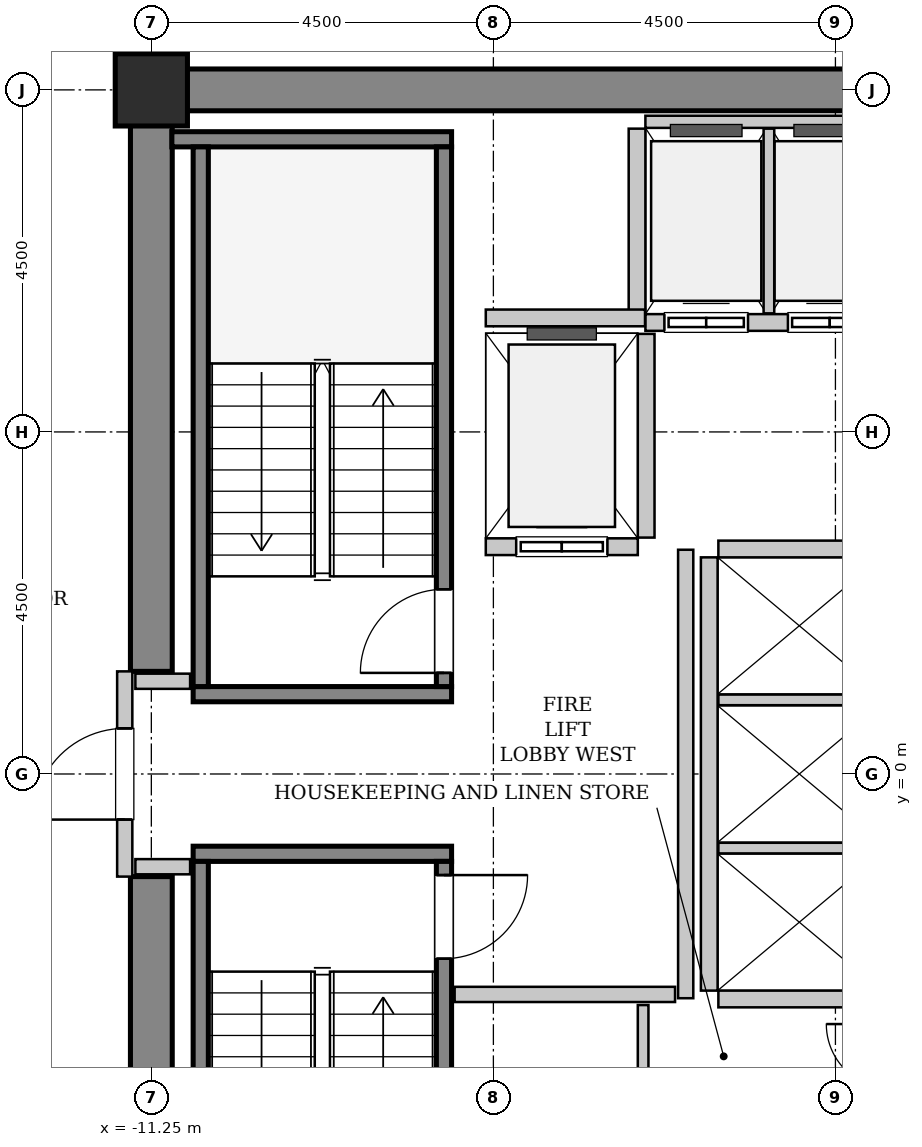
"""IFC4 building model, lengths in metres.
Left out: names, types, materials, properties, quantities, classifications, styles, units other than length and angle.
Written with IfcOpenShell. Run it as: python <this file> out.ifc"""

import sys

from ifc_helpers import new_model, si_unit, direction, frame, frame_2d, origin, origin_2d, place, context, subcontext, project, spatial, rectangle, hollow_rectangle, extrude, source, transform, mapped, element, fill, save


model = new_model("IFC4")
c1 = context("Model", 3, precision=1e-05, world=origin(), true_north=direction((0.0, 1.0)))
c2 = subcontext(c1, "Body", "Model", "MODEL_VIEW")
j1 = project(units=[si_unit("LENGTHUNIT", "METRE"), si_unit("PLANEANGLEUNIT", "RADIAN")], contexts=[c1])
p1 = place(None, origin())
s1 = spatial("IfcSite", under=j1, at=p1, CompositionType="ELEMENT")
p2 = place(p1, origin())
s2 = spatial("IfcBuilding", under=s1, at=p2, CompositionType="ELEMENT")
p3 = place(p2, frame((0.0, 0.0, 106.0)))
s3 = spatial("IfcBuildingStorey", under=s2, at=p3, CompositionType="ELEMENT", Elevation=106.0)
m1 = source(origin(), c2, "Body", "SweptSolid", [
    extrude(rectangle(XDim=9.975, YDim=0.55, at=frame_2d((4.987, 0.0))), origin(), (0.0, 0.0, 1.0), 3.8),
])
p4 = place(p3, frame((-11.525, 9.0, 0.0), z_axis=(0.0, 0.0, 1.0), x_axis=(1.0, 0.0, 0.0)))
e1 = element("IfcWall", 1, at=p4, inside=s3, PredefinedType="SHEAR", context=c2, shape_type="MappedRepresentation", body=[
    mapped(m1, transform((0.0, 0.0, 0.0), x_axis=(1.0, 0.0, 0.0), y_axis=(0.0, 1.0, 0.0), z_axis=(0.0, 0.0, 1.0), scale=1.0)),
])
m2 = source(origin(), c2, "Body", "SweptSolid", [
    extrude(rectangle(XDim=7.375, YDim=0.55, at=frame_2d((3.688, 0.0))), origin(), (0.0, 0.0, 1.0), 3.8),
])
for number, where, z_axis, x_axis in (
    (2, (-11.25, -8.725, 0.0), (0.0, 0.0, 1.0), (0.0, 1.0, 0.0)),
    (3, (-11.25, 1.35, 0.0), (0.0, 0.0, 1.0), (0.0, 1.0, 0.0)),
):
    element("IfcWall", number, at=place(p3, frame(where, z_axis=z_axis, x_axis=x_axis)), inside=s3, PredefinedType="SHEAR", context=c2, shape_type="MappedRepresentation", body=[
        mapped(m2, transform((0.0, 0.0, 0.0), x_axis=(1.0, 0.0, 0.0), y_axis=(0.0, 1.0, 0.0), z_axis=(0.0, 0.0, 1.0), scale=1.0)),
    ])
m3 = source(origin(), c2, "Body", "SweptSolid", [
    extrude(hollow_rectangle(XDim=0.95, YDim=0.95, WallThickness=0.045, InnerFilletRadius=0.045, OuterFilletRadius=0.09, at=origin_2d()), origin(), (0.0, 0.0, 1.0), 3.8),
])
p5 = place(p3, frame((-11.25, 9.0, 0.0), z_axis=(0.0, 0.0, 1.0), x_axis=(1.0, 0.0, 0.0)))
e4 = element("IfcColumn", 4, at=p5, inside=s3, PredefinedType="COLUMN", context=c2, shape_type="MappedRepresentation", body=[
    mapped(m3, transform((0.0, 0.0, 0.0), x_axis=(1.0, 0.0, 0.0), y_axis=(0.0, 1.0, 0.0), z_axis=(0.0, 0.0, 1.0), scale=1.0)),
])
m4 = source(origin(), c2, "Body", "SweptSolid", [
    extrude(rectangle(XDim=3.4, YDim=0.2, at=frame_2d((1.7, 0.0))), origin(), (0.0, 0.0, 1.0), 3.8),
])
p6 = place(p3, frame((-7.3, 1.05, 0.0), z_axis=(0.0, 0.0, 1.0), x_axis=(-1.0, 0.0, 0.0)))
e5 = element("IfcWall", 5, at=p6, inside=s3, PredefinedType="SOLIDWALL", context=c2, shape_type="MappedRepresentation", body=[
    mapped(m4, transform((0.0, 0.0, 0.0), x_axis=(1.0, 0.0, 0.0), y_axis=(0.0, 1.0, 0.0), z_axis=(0.0, 0.0, 1.0), scale=1.0)),
])
m5 = source(origin(), c2, "Body", "SweptSolid", [
    extrude(rectangle(XDim=3.68, YDim=0.2, at=frame_2d((1.84, 0.0))), origin(), (0.0, 0.0, 1.0), 3.8),
])
p7 = place(p3, frame((-7.3, 8.35, 0.0), z_axis=(0.0, 0.0, 1.0), x_axis=(-1.0, 0.0, 0.0)))
e6 = element("IfcWall", 6, at=p7, inside=s3, PredefinedType="SOLIDWALL", context=c2, shape_type="MappedRepresentation", body=[
    mapped(m5, transform((0.0, 0.0, 0.0), x_axis=(1.0, 0.0, 0.0), y_axis=(0.0, 1.0, 0.0), z_axis=(0.0, 0.0, 1.0), scale=1.0)),
])
m6 = source(origin(), c2, "Body", "SweptSolid", [
    extrude(rectangle(XDim=7.1, YDim=0.2, at=frame_2d((3.55, 0.0))), origin(), (0.0, 0.0, 1.0), 3.8),
])
p8 = place(p3, frame((-7.4, 1.15, 0.0), z_axis=(0.0, 0.0, 1.0), x_axis=(0.0, 1.0, 0.0)))
e7 = element("IfcWall", 7, at=p8, inside=s3, PredefinedType="SOLIDWALL", context=c2, shape_type="MappedRepresentation", body=[
    mapped(m6, transform((0.0, 0.0, 0.0), x_axis=(1.0, 0.0, 0.0), y_axis=(0.0, 1.0, 0.0), z_axis=(0.0, 0.0, 1.0), scale=1.0)),
])
p9 = place(p8, frame((0.18, 0.0, 0.0)))
e8 = element("IfcOpeningElement", 8, at=p9, cuts=e7, PredefinedType="OPENING", context=c2, shape_type="SweptSolid", body=[
    extrude(rectangle(XDim=1.1, YDim=2.15, at=frame_2d((0.55, 1.075))), frame((0.0, 0.11, 0.0), z_axis=(0.0, -1.0, 0.0), x_axis=(1.0, 0.0, 0.0)), (0.0, 0.0, 1.0), 0.22),
])
p10 = place(p3, frame((-10.6, 1.15, 0.0), z_axis=(0.0, 0.0, 1.0), x_axis=(0.0, 1.0, 0.0)))
e9 = element("IfcWall", 9, at=p10, inside=s3, PredefinedType="SOLIDWALL", context=c2, shape_type="MappedRepresentation", body=[
    mapped(m6, transform((0.0, 0.0, 0.0), x_axis=(1.0, 0.0, 0.0), y_axis=(0.0, 1.0, 0.0), z_axis=(0.0, 0.0, 1.0), scale=1.0)),
])
p11 = place(p3, frame((-10.7, -1.05, 0.0), z_axis=(0.0, 0.0, 1.0), x_axis=(1.0, 0.0, 0.0)))
e10 = element("IfcWall", 10, at=p11, inside=s3, PredefinedType="SOLIDWALL", context=c2, shape_type="MappedRepresentation", body=[
    mapped(m4, transform((0.0, 0.0, 0.0), x_axis=(1.0, 0.0, 0.0), y_axis=(0.0, 1.0, 0.0), z_axis=(0.0, 0.0, 1.0), scale=1.0)),
])
p12 = place(p3, frame((-10.6, -1.15, 0.0), z_axis=(0.0, 0.0, 1.0), x_axis=(0.0, -1.0, 0.0)))
e11 = element("IfcWall", 11, at=p12, inside=s3, PredefinedType="SOLIDWALL", context=c2, shape_type="MappedRepresentation", body=[
    mapped(m6, transform((0.0, 0.0, 0.0), x_axis=(1.0, 0.0, 0.0), y_axis=(0.0, 1.0, 0.0), z_axis=(0.0, 0.0, 1.0), scale=1.0)),
])
p13 = place(p3, frame((-7.4, -1.15, 0.0), z_axis=(0.0, 0.0, 1.0), x_axis=(0.0, -1.0, 0.0)))
e12 = element("IfcWall", 12, at=p13, inside=s3, PredefinedType="SOLIDWALL", context=c2, shape_type="MappedRepresentation", body=[
    mapped(m6, transform((0.0, 0.0, 0.0), x_axis=(1.0, 0.0, 0.0), y_axis=(0.0, 1.0, 0.0), z_axis=(0.0, 0.0, 1.0), scale=1.0)),
])
p14 = place(p13, frame((0.18, 0.0, 0.0)))
e13 = element("IfcOpeningElement", 13, at=p14, cuts=e12, PredefinedType="OPENING", context=c2, shape_type="SweptSolid", body=[
    extrude(rectangle(XDim=1.1, YDim=2.15, at=frame_2d((0.55, 1.075))), frame((0.0, 0.11, 0.0), z_axis=(0.0, -1.0, 0.0), x_axis=(1.0, 0.0, 0.0)), (0.0, 0.0, 1.0), 0.22),
])
m7 = source(origin(), c2, "Body", "SweptSolid", [
    extrude(rectangle(XDim=2.0, YDim=0.22, at=frame_2d((1.0, 0.0))), origin(), (0.0, 0.0, 1.0), 3.535),
])
p15 = place(p3, frame((-6.85, 2.99, 0.0), z_axis=(0.0, 0.0, 1.0), x_axis=(1.0, 0.0, 0.0)))
e14 = element("IfcWall", 14, at=p15, inside=s3, PredefinedType="SOLIDWALL", context=c2, shape_type="MappedRepresentation", body=[
    mapped(m7, transform((0.0, 0.0, 0.0), x_axis=(1.0, 0.0, 0.0), y_axis=(0.0, 1.0, 0.0), z_axis=(0.0, 0.0, 1.0), scale=1.0)),
])
p16 = place(p15, frame((0.4, 0.0, 0.0)))
e15 = element("IfcOpeningElement", 15, at=p16, cuts=e14, PredefinedType="OPENING", context=c2, shape_type="SweptSolid", body=[
    extrude(rectangle(XDim=1.2, YDim=2.2, at=frame_2d((0.6, 1.1))), frame((0.0, 0.12, 0.0), z_axis=(0.0, -1.0, 0.0), x_axis=(1.0, 0.0, 0.0)), (0.0, 0.0, 1.0), 0.24),
])
m8 = source(origin(), c2, "Body", "SweptSolid", [
    extrude(rectangle(XDim=2.68, YDim=0.22, at=frame_2d((1.34, 0.0))), origin(), (0.0, 0.0, 1.0), 3.535),
])
p17 = place(p3, frame((-4.74, 3.11, 0.0), z_axis=(0.0, 0.0, 1.0), x_axis=(0.0, 1.0, 0.0)))
e16 = element("IfcWall", 16, at=p17, inside=s3, PredefinedType="SOLIDWALL", context=c2, shape_type="MappedRepresentation", body=[
    mapped(m8, transform((0.0, 0.0, 0.0), x_axis=(1.0, 0.0, 0.0), y_axis=(0.0, 1.0, 0.0), z_axis=(0.0, 0.0, 1.0), scale=1.0)),
])
m9 = source(origin(), c2, "Body", "SweptSolid", [
    extrude(rectangle(XDim=3.2, YDim=0.22, at=frame_2d((1.6, 0.0))), origin(), (0.0, 0.0, 1.0), 3.535),
])
p18 = place(p3, frame((-4.75, 5.94, 0.0), z_axis=(0.0, 0.0, 1.0), x_axis=(1.0, 0.0, 0.0)))
e17 = element("IfcWall", 17, at=p18, inside=s3, PredefinedType="SOLIDWALL", context=c2, shape_type="MappedRepresentation", body=[
    mapped(m9, transform((0.0, 0.0, 0.0), x_axis=(1.0, 0.0, 0.0), y_axis=(0.0, 1.0, 0.0), z_axis=(0.0, 0.0, 1.0), scale=1.0)),
])
p19 = place(p18, frame((0.25, 0.0, 0.0)))
e18 = element("IfcOpeningElement", 18, at=p19, cuts=e17, PredefinedType="OPENING", context=c2, shape_type="SweptSolid", body=[
    extrude(rectangle(XDim=1.1, YDim=2.2, at=frame_2d((0.55, 1.1))), frame((0.0, 0.12, 0.0), z_axis=(0.0, -1.0, 0.0), x_axis=(1.0, 0.0, 0.0)), (0.0, 0.0, 1.0), 0.24),
])
p20 = place(p18, frame((1.875, 0.0, 0.0)))
e19 = element("IfcOpeningElement", 19, at=p20, cuts=e17, PredefinedType="OPENING", context=c2, shape_type="SweptSolid", body=[
    extrude(rectangle(XDim=1.1, YDim=2.2, at=frame_2d((0.55, 1.1))), frame((0.0, 0.12, 0.0), z_axis=(0.0, -1.0, 0.0), x_axis=(1.0, 0.0, 0.0)), (0.0, 0.0, 1.0), 0.24),
])
m10 = source(origin(), c2, "Body", "SweptSolid", [
    extrude(rectangle(XDim=3.2, YDim=0.16, at=frame_2d((1.6, 0.0))), origin(), (0.0, 0.0, 1.0), 2.425),
])
p21 = place(p3, frame((-1.55, 8.58, 0.0), z_axis=(0.0, 0.0, 1.0), x_axis=(-1.0, 0.0, 0.0)))
e20 = element("IfcWall", 20, at=p21, inside=s3, PredefinedType="PARTITIONING", context=c2, shape_type="MappedRepresentation", body=[
    mapped(m10, transform((0.0, 0.0, 0.0), x_axis=(1.0, 0.0, 0.0), y_axis=(0.0, 1.0, 0.0), z_axis=(0.0, 0.0, 1.0), scale=1.0)),
])
m11 = source(origin(), c2, "Body", "SweptSolid", [
    extrude(rectangle(XDim=2.43, YDim=0.22, at=frame_2d((1.215, 0.0))), origin(), (0.0, 0.0, 1.0), 3.535),
])
p22 = place(p3, frame((-4.86, 8.49, 0.0), z_axis=(0.0, 0.0, 1.0), x_axis=(0.0, -1.0, 0.0)))
e21 = element("IfcWall", 21, at=p22, inside=s3, PredefinedType="SOLIDWALL", context=c2, shape_type="MappedRepresentation", body=[
    mapped(m11, transform((0.0, 0.0, 0.0), x_axis=(1.0, 0.0, 0.0), y_axis=(0.0, 1.0, 0.0), z_axis=(0.0, 0.0, 1.0), scale=1.0)),
])
m12 = source(origin(), c2, "Body", "SweptSolid", [
    extrude(rectangle(XDim=2.43, YDim=0.14, at=frame_2d((1.215, 0.0))), origin(), (0.0, 0.0, 1.0), 3.535),
])
p23 = place(p3, frame((-3.125, 6.06, 0.0), z_axis=(0.0, 0.0, 1.0), x_axis=(0.0, 1.0, 0.0)))
e22 = element("IfcWall", 22, at=p23, inside=s3, PredefinedType="PARTITIONING", context=c2, shape_type="MappedRepresentation", body=[
    mapped(m12, transform((0.0, 0.0, 0.0), x_axis=(1.0, 0.0, 0.0), y_axis=(0.0, 1.0, 0.0), z_axis=(0.0, 0.0, 1.0), scale=1.0)),
])
m13 = source(origin(), c2, "Body", "SweptSolid", [
    extrude(rectangle(XDim=5.7, YDim=0.22, at=frame_2d((2.85, 0.0))), origin(), (0.0, 0.0, 1.0), 3.535),
])
p24 = place(p3, frame((-3.91, 2.85, 0.0), z_axis=(0.0, 0.0, 1.0), x_axis=(0.0, -1.0, 0.0)))
e23 = element("IfcWall", 23, at=p24, inside=s3, PredefinedType="SOLIDWALL", context=c2, shape_type="MappedRepresentation", body=[
    mapped(m13, transform((0.0, 0.0, 0.0), x_axis=(1.0, 0.0, 0.0), y_axis=(0.0, 1.0, 0.0), z_axis=(0.0, 0.0, 1.0), scale=1.0)),
])
m14 = source(origin(), c2, "Body", "SweptSolid", [
    extrude(rectangle(XDim=2.13, YDim=0.22, at=frame_2d((1.065, 0.0))), origin(), (0.0, 0.0, 1.0), 3.535),
])
p25 = place(p3, frame((-3.79, -2.96, 0.0), z_axis=(0.0, 0.0, 1.0), x_axis=(1.0, 0.0, 0.0)))
e24 = element("IfcWall", 24, at=p25, inside=s3, PredefinedType="SOLIDWALL", context=c2, shape_type="MappedRepresentation", body=[
    mapped(m14, transform((0.0, 0.0, 0.0), x_axis=(1.0, 0.0, 0.0), y_axis=(0.0, 1.0, 0.0), z_axis=(0.0, 0.0, 1.0), scale=1.0)),
])
m15 = source(origin(), c2, "Body", "SweptSolid", [
    extrude(rectangle(XDim=2.13, YDim=0.14, at=frame_2d((1.065, 0.0))), origin(), (0.0, 0.0, 1.0), 3.535),
])
for number, where, z_axis, x_axis in (
    (25, (-3.79, -0.975, 0.0), (0.0, 0.0, 1.0), (1.0, 0.0, 0.0)),
    (26, (-3.79, 0.975, 0.0), (0.0, 0.0, 1.0), (1.0, 0.0, 0.0)),
):
    element("IfcWall", number, at=place(p3, frame(where, z_axis=z_axis, x_axis=x_axis)), inside=s3, PredefinedType="PARTITIONING", context=c2, shape_type="MappedRepresentation", body=[
        mapped(m15, transform((0.0, 0.0, 0.0), x_axis=(1.0, 0.0, 0.0), y_axis=(0.0, 1.0, 0.0), z_axis=(0.0, 0.0, 1.0), scale=1.0)),
    ])
p26 = place(p3, frame((-1.66, 2.96, 0.0), z_axis=(0.0, 0.0, 1.0), x_axis=(-1.0, 0.0, 0.0)))
e27 = element("IfcWall", 27, at=p26, inside=s3, PredefinedType="SOLIDWALL", context=c2, shape_type="MappedRepresentation", body=[
    mapped(m14, transform((0.0, 0.0, 0.0), x_axis=(1.0, 0.0, 0.0), y_axis=(0.0, 1.0, 0.0), z_axis=(0.0, 0.0, 1.0), scale=1.0)),
])
m16 = source(origin(), c2, "Body", "SweptSolid", [
    extrude(rectangle(XDim=2.095, YDim=0.22, at=frame_2d((1.048, 0.0))), origin(), (0.0, 0.0, 1.0), 3.535),
])
p27 = place(p3, frame((-6.85, 6.0, 0.0), z_axis=(0.0, 0.0, 1.0), x_axis=(1.0, 0.0, 0.0)))
e28 = element("IfcWall", 28, at=p27, inside=s3, PredefinedType="SOLIDWALL", context=c2, shape_type="MappedRepresentation", body=[
    mapped(m16, transform((0.0, 0.0, 0.0), x_axis=(1.0, 0.0, 0.0), y_axis=(0.0, 1.0, 0.0), z_axis=(0.0, 0.0, 1.0), scale=1.0)),
])
m17 = source(origin(), c2, "Body", "SweptSolid", [
    extrude(rectangle(XDim=2.7, YDim=0.2, at=frame_2d((1.35, 0.0))), origin(), (0.0, 0.0, 1.0), 2.425),
])
p28 = place(p3, frame((-11.6, -1.35, 0.0), z_axis=(0.0, 0.0, 1.0), x_axis=(0.0, 1.0, 0.0)))
e29 = element("IfcWall", 29, at=p28, inside=s3, PredefinedType="PARTITIONING", context=c2, shape_type="MappedRepresentation", body=[
    mapped(m17, transform((0.0, 0.0, 0.0), x_axis=(1.0, 0.0, 0.0), y_axis=(0.0, 1.0, 0.0), z_axis=(0.0, 0.0, 1.0), scale=1.0)),
])
p29 = place(p28, frame((0.75, 0.0, 0.0)))
e30 = element("IfcOpeningElement", 30, at=p29, cuts=e29, PredefinedType="OPENING", context=c2, shape_type="SweptSolid", body=[
    extrude(rectangle(XDim=1.2, YDim=2.15, at=frame_2d((0.6, 1.075))), frame((0.0, 0.11, 0.0), z_axis=(0.0, -1.0, 0.0), x_axis=(1.0, 0.0, 0.0)), (0.0, 0.0, 1.0), 0.22),
])
m18 = source(origin(), c2, "Body", "SweptSolid", [
    extrude(rectangle(XDim=5.9, YDim=0.2, at=frame_2d((2.95, 0.0))), origin(), (0.0, 0.0, 1.0), 3.535),
])
p30 = place(p3, frame((-4.22, -2.95, 0.0), z_axis=(0.0, 0.0, 1.0), x_axis=(0.0, 1.0, 0.0)))
e31 = element("IfcWall", 31, at=p30, inside=s3, PredefinedType="PARTITIONING", context=c2, shape_type="MappedRepresentation", body=[
    mapped(m18, transform((0.0, 0.0, 0.0), x_axis=(1.0, 0.0, 0.0), y_axis=(0.0, 1.0, 0.0), z_axis=(0.0, 0.0, 1.0), scale=1.0)),
])
m19 = source(origin(), c2, "Body", "SweptSolid", [
    extrude(rectangle(XDim=2.9, YDim=0.2, at=frame_2d((1.45, 0.0))), origin(), (0.0, 0.0, 1.0), 3.535),
])
p31 = place(p3, frame((-7.26, -2.9, 0.0), z_axis=(0.0, 0.0, 1.0), x_axis=(1.0, 0.0, 0.0)))
e32 = element("IfcWall", 32, at=p31, inside=s3, PredefinedType="PARTITIONING", context=c2, shape_type="MappedRepresentation", body=[
    mapped(m19, transform((0.0, 0.0, 0.0), x_axis=(1.0, 0.0, 0.0), y_axis=(0.0, 1.0, 0.0), z_axis=(0.0, 0.0, 1.0), scale=1.0)),
])
m20 = source(origin(), c2, "Body", "SweptSolid", [
    extrude(rectangle(XDim=0.72, YDim=0.2, at=frame_2d((0.36, 0.0))), origin(), (0.0, 0.0, 1.0), 3.535),
])
for number, where, z_axis, x_axis in (
    (33, (-11.46, 1.22, 0.0), (0.0, 0.0, 1.0), (1.0, 0.0, 0.0)),
    (34, (-11.46, -1.22, 0.0), (0.0, 0.0, 1.0), (1.0, 0.0, 0.0)),
):
    element("IfcWall", number, at=place(p3, frame(where, z_axis=z_axis, x_axis=x_axis)), inside=s3, PredefinedType="PARTITIONING", context=c2, shape_type="MappedRepresentation", body=[
        mapped(m20, transform((0.0, 0.0, 0.0), x_axis=(1.0, 0.0, 0.0), y_axis=(0.0, 1.0, 0.0), z_axis=(0.0, 0.0, 1.0), scale=1.0)),
    ])
m21 = source(origin(), c2, "Body", "SweptSolid", [
    extrude(rectangle(XDim=1.26, YDim=0.14, at=frame_2d((0.63, 0.0))), origin(), (0.0, 0.0, 1.0), 3.535),
])
p32 = place(p3, frame((-4.78, -4.3, 0.0), z_axis=(0.0, 0.0, 1.0), x_axis=(0.0, 1.0, 0.0)))
e35 = element("IfcWall", 35, at=p32, inside=s3, PredefinedType="PARTITIONING", context=c2, shape_type="MappedRepresentation", body=[
    mapped(m21, transform((0.0, 0.0, 0.0), x_axis=(1.0, 0.0, 0.0), y_axis=(0.0, 1.0, 0.0), z_axis=(0.0, 0.0, 1.0), scale=1.0)),
])
m22 = source(origin(), c2, "Body", "SweptSolid", [
    extrude(rectangle(XDim=1.1, YDim=2.15, at=frame_2d((0.55, 1.075))), frame((0.0, 0.025, 0.0), z_axis=(0.0, -1.0, 0.0), x_axis=(1.0, 0.0, 0.0)), (0.0, 0.0, 1.0), 0.05),
])
p33 = place(p9, origin())
e36 = element("IfcDoor", 36, at=p33, inside=s3, OperationType="SINGLE_SWING_LEFT", PredefinedType="DOOR", context=c2, shape_type="MappedRepresentation", body=[
    mapped(m22, transform((0.0, 0.0, 0.0), x_axis=(1.0, 0.0, 0.0), y_axis=(0.0, 1.0, 0.0), z_axis=(0.0, 0.0, 1.0), scale=1.0)),
])
fill(e8, e36)
p34 = place(p14, origin())
e37 = element("IfcDoor", 37, at=p34, inside=s3, OperationType="SINGLE_SWING_LEFT", PredefinedType="DOOR", context=c2, shape_type="MappedRepresentation", body=[
    mapped(m22, transform((0.0, 0.0, 0.0), x_axis=(1.0, 0.0, 0.0), y_axis=(0.0, 1.0, 0.0), z_axis=(0.0, 0.0, 1.0), scale=1.0)),
])
fill(e13, e37)
m23 = source(origin(), c2, "Body", "SweptSolid", [
    extrude(rectangle(XDim=1.2, YDim=2.2, at=frame_2d((0.6, 1.1))), frame((0.0, 0.025, 0.0), z_axis=(0.0, -1.0, 0.0), x_axis=(1.0, 0.0, 0.0)), (0.0, 0.0, 1.0), 0.05),
])
p35 = place(p16, origin())
e38 = element("IfcDoor", 38, at=p35, inside=s3, OperationType="SLIDING_TO_LEFT", PredefinedType="DOOR", context=c2, shape_type="MappedRepresentation", body=[
    mapped(m23, transform((0.0, 0.0, 0.0), x_axis=(1.0, 0.0, 0.0), y_axis=(0.0, 1.0, 0.0), z_axis=(0.0, 0.0, 1.0), scale=1.0)),
])
fill(e15, e38)
m24 = source(origin(), c2, "Body", "SweptSolid", [
    extrude(rectangle(XDim=1.1, YDim=2.2, at=frame_2d((0.55, 1.1))), frame((0.0, 0.025, 0.0), z_axis=(0.0, -1.0, 0.0), x_axis=(1.0, 0.0, 0.0)), (0.0, 0.0, 1.0), 0.05),
])
p36 = place(p19, origin())
e39 = element("IfcDoor", 39, at=p36, inside=s3, OperationType="DOUBLE_DOOR_SLIDING", PredefinedType="DOOR", context=c2, shape_type="MappedRepresentation", body=[
    mapped(m24, transform((0.0, 0.0, 0.0), x_axis=(1.0, 0.0, 0.0), y_axis=(0.0, 1.0, 0.0), z_axis=(0.0, 0.0, 1.0), scale=1.0)),
])
fill(e18, e39)
p37 = place(p20, origin())
e40 = element("IfcDoor", 40, at=p37, inside=s3, OperationType="DOUBLE_DOOR_SLIDING", PredefinedType="DOOR", context=c2, shape_type="MappedRepresentation", body=[
    mapped(m24, transform((0.0, 0.0, 0.0), x_axis=(1.0, 0.0, 0.0), y_axis=(0.0, 1.0, 0.0), z_axis=(0.0, 0.0, 1.0), scale=1.0)),
])
fill(e19, e40)
m25 = source(origin(), c2, "Body", "SweptSolid", [
    extrude(rectangle(XDim=1.2, YDim=2.15, at=frame_2d((0.6, 1.075))), frame((0.0, 0.025, 0.0), z_axis=(0.0, -1.0, 0.0), x_axis=(1.0, 0.0, 0.0)), (0.0, 0.0, 1.0), 0.05),
])
p38 = place(p29, origin())
e41 = element("IfcDoor", 41, at=p38, inside=s3, OperationType="SINGLE_SWING_LEFT", PredefinedType="DOOR", context=c2, shape_type="MappedRepresentation", body=[
    mapped(m25, transform((0.0, 0.0, 0.0), x_axis=(1.0, 0.0, 0.0), y_axis=(0.0, 1.0, 0.0), z_axis=(0.0, 0.0, 1.0), scale=1.0)),
])
fill(e30, e41)
save(model, sys.argv[1])
